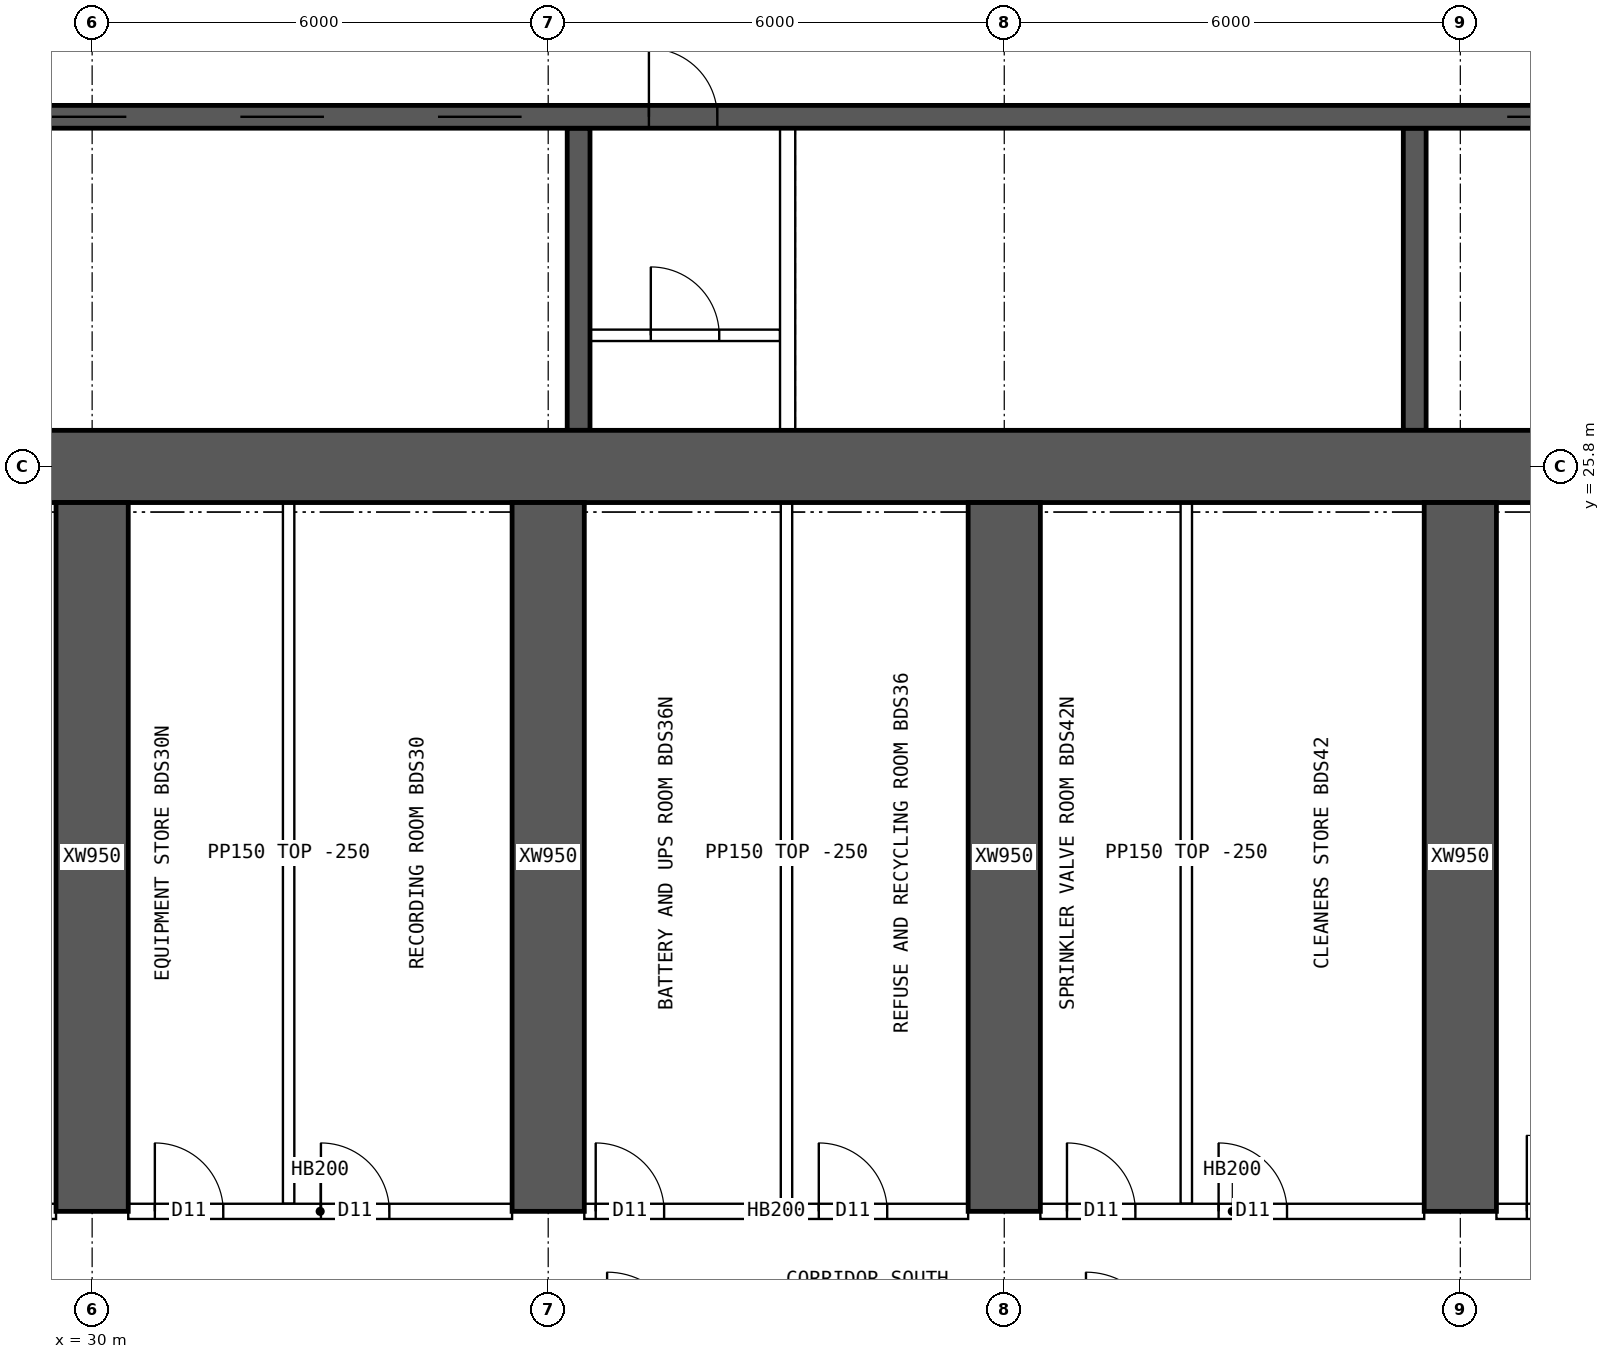
"""IFC4 building model, lengths in metres.
Left out: names, types, materials, properties, quantities, classifications, styles, units other than length and angle.
Written with IfcOpenShell. Run it as: python <this file> out.ifc"""

import sys

from ifc_helpers import new_model, si_unit, direction, frame, frame_2d, origin, place, context, subcontext, project, spatial, rectangle, extrude, element, fill, save


model = new_model("IFC4")
c1 = context("Model", 3, precision=1e-05, world=origin(), true_north=direction((0.0, 1.0)))
c2 = subcontext(c1, "Body", "Model", "MODEL_VIEW")
j1 = project(units=[si_unit("LENGTHUNIT", "METRE"), si_unit("PLANEANGLEUNIT", "RADIAN")], contexts=[c1])
p1 = place(None, origin())
s1 = spatial("IfcSite", under=j1, at=p1, CompositionType="ELEMENT")
p2 = place(p1, origin())
s2 = spatial("IfcBuilding", under=s1, at=p2, CompositionType="ELEMENT")
p3 = place(p2, frame((0.0, 0.0, 84.4)))
s3 = spatial("IfcBuildingStorey", under=s2, at=p3, CompositionType="ELEMENT", Elevation=84.4)
p4 = place(p3, frame((18.0, 25.8, 0.0), z_axis=(0.0, 0.0, 1.0), x_axis=(1.0, 0.0, 0.0)))
e1 = element("IfcWall", 1, at=p4, inside=s3, PredefinedType="SHEAR", context=c2, shape_type="SweptSolid", body=[
    extrude(rectangle(XDim=48.0, YDim=0.95, at=frame_2d((24.0, 0.0))), origin(), (0.0, 0.0, 1.0), 3.75),
])
p5 = place(p3, frame((18.475, 30.4, 0.0), z_axis=(0.0, 0.0, 1.0), x_axis=(1.0, 0.0, 0.0)))
e2 = element("IfcWall", 2, at=p5, inside=s3, PredefinedType="SHEAR", context=c2, shape_type="SweptSolid", body=[
    extrude(rectangle(XDim=47.05, YDim=0.3, at=frame_2d((23.525, 0.0))), origin(), (0.0, 0.0, 1.0), 3.75),
])
p6 = place(p5, frame((0.4, 0.0, 0.0)))
e3 = element("IfcOpeningElement", 3, at=p6, cuts=e2, PredefinedType="OPENING", context=c2, shape_type="SweptSolid", body=[
    extrude(rectangle(XDim=1.0, YDim=2.1, at=frame_2d((0.5, 1.05))), frame((0.0, 0.16, 0.0), z_axis=(0.0, -1.0, 0.0), x_axis=(1.0, 0.0, 0.0)), (0.0, 0.0, 1.0), 0.32),
])
p7 = place(p5, frame((45.65, 0.0, 0.0)))
e4 = element("IfcOpeningElement", 4, at=p7, cuts=e2, PredefinedType="OPENING", context=c2, shape_type="SweptSolid", body=[
    extrude(rectangle(XDim=1.0, YDim=2.1, at=frame_2d((0.5, 1.05))), frame((0.0, 0.16, 0.0), z_axis=(0.0, -1.0, 0.0), x_axis=(1.0, 0.0, 0.0)), (0.0, 0.0, 1.0), 0.32),
])
p8 = place(p5, frame((8.275, 0.0, 0.0)))
e5 = element("IfcOpeningElement", 5, at=p8, cuts=e2, PredefinedType="OPENING", context=c2, shape_type="SweptSolid", body=[
    extrude(rectangle(XDim=1.1, YDim=2.1, at=frame_2d((0.55, 1.05))), frame((0.0, 0.16, 0.0), z_axis=(0.0, -1.0, 0.0), x_axis=(1.0, 0.0, 0.0)), (0.0, 0.0, 1.0), 0.32),
])
p9 = place(p5, frame((10.875, 0.0, 0.0)))
e6 = element("IfcOpeningElement", 6, at=p9, cuts=e2, PredefinedType="OPENING", context=c2, shape_type="SweptSolid", body=[
    extrude(rectangle(XDim=1.1, YDim=2.1, at=frame_2d((0.55, 1.05))), frame((0.0, 0.16, 0.0), z_axis=(0.0, -1.0, 0.0), x_axis=(1.0, 0.0, 0.0)), (0.0, 0.0, 1.0), 0.32),
])
p10 = place(p5, frame((13.475, 0.0, 0.0)))
e7 = element("IfcOpeningElement", 7, at=p10, cuts=e2, PredefinedType="OPENING", context=c2, shape_type="SweptSolid", body=[
    extrude(rectangle(XDim=1.1, YDim=2.1, at=frame_2d((0.55, 1.05))), frame((0.0, 0.16, 0.0), z_axis=(0.0, -1.0, 0.0), x_axis=(1.0, 0.0, 0.0)), (0.0, 0.0, 1.0), 0.32),
])
p11 = place(p5, frame((16.075, 0.0, 0.0)))
e8 = element("IfcOpeningElement", 8, at=p11, cuts=e2, PredefinedType="OPENING", context=c2, shape_type="SweptSolid", body=[
    extrude(rectangle(XDim=1.1, YDim=2.1, at=frame_2d((0.55, 1.05))), frame((0.0, 0.16, 0.0), z_axis=(0.0, -1.0, 0.0), x_axis=(1.0, 0.0, 0.0)), (0.0, 0.0, 1.0), 0.32),
])
p12 = place(p5, frame((18.85, 0.0, 0.0)))
e9 = element("IfcOpeningElement", 9, at=p12, cuts=e2, PredefinedType="OPENING", context=c2, shape_type="SweptSolid", body=[
    extrude(rectangle(XDim=0.9, YDim=2.1, at=frame_2d((0.45, 1.05))), frame((0.0, 0.16, 0.0), z_axis=(0.0, -1.0, 0.0), x_axis=(1.0, 0.0, 0.0)), (0.0, 0.0, 1.0), 0.32),
])
p13 = place(p5, frame((30.142, 0.0, 0.0)))
e10 = element("IfcOpeningElement", 10, at=p13, cuts=e2, PredefinedType="OPENING", context=c2, shape_type="SweptSolid", body=[
    extrude(rectangle(XDim=1.1, YDim=2.1, at=frame_2d((0.55, 1.05))), frame((0.0, 0.16, 0.0), z_axis=(0.0, -1.0, 0.0), x_axis=(1.0, 0.0, 0.0)), (0.0, 0.0, 1.0), 0.32),
])
p14 = place(p5, frame((33.675, 0.0, 0.0)))
e11 = element("IfcOpeningElement", 11, at=p14, cuts=e2, PredefinedType="OPENING", context=c2, shape_type="SweptSolid", body=[
    extrude(rectangle(XDim=1.1, YDim=2.1, at=frame_2d((0.55, 1.05))), frame((0.0, 0.16, 0.0), z_axis=(0.0, -1.0, 0.0), x_axis=(1.0, 0.0, 0.0)), (0.0, 0.0, 1.0), 0.32),
])
p15 = place(p5, frame((37.208, 0.0, 0.0)))
e12 = element("IfcOpeningElement", 12, at=p15, cuts=e2, PredefinedType="OPENING", context=c2, shape_type="SweptSolid", body=[
    extrude(rectangle(XDim=1.1, YDim=2.1, at=frame_2d((0.55, 1.05))), frame((0.0, 0.16, 0.0), z_axis=(0.0, -1.0, 0.0), x_axis=(1.0, 0.0, 0.0)), (0.0, 0.0, 1.0), 0.32),
])
for number, where, z_axis, x_axis in (
    (13, (36.4, 26.275, 0.0), (0.0, 0.0, 1.0), (0.0, 1.0, 0.0)),
    (14, (47.4, 26.275, 0.0), (0.0, 0.0, 1.0), (0.0, 1.0, 0.0)),
):
    element("IfcWall", number, at=place(p3, frame(where, z_axis=z_axis, x_axis=x_axis)), inside=s3, PredefinedType="SHEAR", context=c2, shape_type="SweptSolid", body=[
        extrude(rectangle(XDim=3.975, YDim=0.3, at=frame_2d((1.988, 0.0))), origin(), (0.0, 0.0, 1.0), 3.75),
    ])
for number, where, z_axis, x_axis in (
    (15, (30.0, 16.0, 0.0), (0.0, 0.0, 1.0), (0.0, 1.0, 0.0)),
    (16, (36.0, 16.0, 0.0), (0.0, 0.0, 1.0), (0.0, 1.0, 0.0)),
    (17, (42.0, 16.0, 0.0), (0.0, 0.0, 1.0), (0.0, 1.0, 0.0)),
    (18, (48.0, 16.0, 0.0), (0.0, 0.0, 1.0), (0.0, 1.0, 0.0)),
):
    element("IfcWall", number, at=place(p3, frame(where, z_axis=z_axis, x_axis=x_axis)), inside=s3, PredefinedType="SHEAR", context=c2, shape_type="SweptSolid", body=[
        extrude(rectangle(XDim=9.325, YDim=0.95, at=frame_2d((4.663, 0.0))), origin(), (0.0, 0.0, 1.0), 3.75),
    ])
p16 = place(p3, frame((36.55, 27.525, 0.0), z_axis=(0.0, 0.0, 1.0), x_axis=(1.0, 0.0, 0.0)))
e19 = element("IfcWall", 19, at=p16, inside=s3, PredefinedType="SOLIDWALL", context=c2, shape_type="SweptSolid", body=[
    extrude(rectangle(XDim=2.5, YDim=0.15, at=frame_2d((1.25, 0.0))), origin(), (0.0, 0.0, 1.0), 3.5),
])
p17 = place(p16, frame((0.8, 0.0, 0.0)))
e20 = element("IfcOpeningElement", 20, at=p17, cuts=e19, PredefinedType="OPENING", context=c2, shape_type="SweptSolid", body=[
    extrude(rectangle(XDim=0.9, YDim=2.1, at=frame_2d((0.45, 1.05))), frame((0.0, 0.085, 0.0), z_axis=(0.0, -1.0, 0.0), x_axis=(1.0, 0.0, 0.0)), (0.0, 0.0, 1.0), 0.17),
])
p18 = place(p3, frame((39.15, 26.275, 0.0), z_axis=(0.0, 0.0, 1.0), x_axis=(0.0, 1.0, 0.0)))
e21 = element("IfcWall", 21, at=p18, inside=s3, PredefinedType="SOLIDWALL", context=c2, shape_type="SweptSolid", body=[
    extrude(rectangle(XDim=3.975, YDim=0.2, at=frame_2d((1.988, 0.0))), origin(), (0.0, 0.0, 1.0), 3.5),
])
p19 = place(p3, frame((24.475, 16.0, 0.0), z_axis=(0.0, 0.0, 1.0), x_axis=(1.0, 0.0, 0.0)))
e22 = element("IfcWall", 22, at=p19, inside=s3, PredefinedType="SOLIDWALL", context=c2, shape_type="SweptSolid", body=[
    extrude(rectangle(XDim=5.05, YDim=0.2, at=frame_2d((2.525, 0.0))), origin(), (0.0, 0.0, 1.0), 3.5),
])
p20 = place(p19, frame((0.15, 0.0, 0.0)))
e23 = element("IfcOpeningElement", 23, at=p20, cuts=e22, PredefinedType="OPENING", context=c2, shape_type="SweptSolid", body=[
    extrude(rectangle(XDim=0.9, YDim=2.1, at=frame_2d((0.45, 1.05))), frame((0.0, 0.11, 0.0), z_axis=(0.0, -1.0, 0.0), x_axis=(1.0, 0.0, 0.0)), (0.0, 0.0, 1.0), 0.22),
])
p21 = place(p19, frame((2.305, 0.0, 0.0)))
e24 = element("IfcOpeningElement", 24, at=p21, cuts=e22, PredefinedType="OPENING", context=c2, shape_type="SweptSolid", body=[
    extrude(rectangle(XDim=0.9, YDim=2.1, at=frame_2d((0.45, 1.05))), frame((0.0, 0.11, 0.0), z_axis=(0.0, -1.0, 0.0), x_axis=(1.0, 0.0, 0.0)), (0.0, 0.0, 1.0), 0.22),
])
p22 = place(p3, frame((30.475, 16.0, 0.0), z_axis=(0.0, 0.0, 1.0), x_axis=(1.0, 0.0, 0.0)))
e25 = element("IfcWall", 25, at=p22, inside=s3, PredefinedType="SOLIDWALL", context=c2, shape_type="SweptSolid", body=[
    extrude(rectangle(XDim=5.05, YDim=0.2, at=frame_2d((2.525, 0.0))), origin(), (0.0, 0.0, 1.0), 3.5),
])
p23 = place(p22, frame((0.35, 0.0, 0.0)))
e26 = element("IfcOpeningElement", 26, at=p23, cuts=e25, PredefinedType="OPENING", context=c2, shape_type="SweptSolid", body=[
    extrude(rectangle(XDim=0.9, YDim=2.1, at=frame_2d((0.45, 1.05))), frame((0.0, 0.11, 0.0), z_axis=(0.0, -1.0, 0.0), x_axis=(1.0, 0.0, 0.0)), (0.0, 0.0, 1.0), 0.22),
])
p24 = place(p22, frame((2.535, 0.0, 0.0)))
e27 = element("IfcOpeningElement", 27, at=p24, cuts=e25, PredefinedType="OPENING", context=c2, shape_type="SweptSolid", body=[
    extrude(rectangle(XDim=0.9, YDim=2.1, at=frame_2d((0.45, 1.05))), frame((0.0, 0.11, 0.0), z_axis=(0.0, -1.0, 0.0), x_axis=(1.0, 0.0, 0.0)), (0.0, 0.0, 1.0), 0.22),
])
p25 = place(p3, frame((36.475, 16.0, 0.0), z_axis=(0.0, 0.0, 1.0), x_axis=(1.0, 0.0, 0.0)))
e28 = element("IfcWall", 28, at=p25, inside=s3, PredefinedType="SOLIDWALL", context=c2, shape_type="SweptSolid", body=[
    extrude(rectangle(XDim=5.05, YDim=0.2, at=frame_2d((2.525, 0.0))), origin(), (0.0, 0.0, 1.0), 3.5),
])
p26 = place(p25, frame((0.15, 0.0, 0.0)))
e29 = element("IfcOpeningElement", 29, at=p26, cuts=e28, PredefinedType="OPENING", context=c2, shape_type="SweptSolid", body=[
    extrude(rectangle(XDim=0.9, YDim=2.1, at=frame_2d((0.45, 1.05))), frame((0.0, 0.11, 0.0), z_axis=(0.0, -1.0, 0.0), x_axis=(1.0, 0.0, 0.0)), (0.0, 0.0, 1.0), 0.22),
])
p27 = place(p25, frame((3.085, 0.0, 0.0)))
e30 = element("IfcOpeningElement", 30, at=p27, cuts=e28, PredefinedType="OPENING", context=c2, shape_type="SweptSolid", body=[
    extrude(rectangle(XDim=0.9, YDim=2.1, at=frame_2d((0.45, 1.05))), frame((0.0, 0.11, 0.0), z_axis=(0.0, -1.0, 0.0), x_axis=(1.0, 0.0, 0.0)), (0.0, 0.0, 1.0), 0.22),
])
p28 = place(p3, frame((42.475, 16.0, 0.0), z_axis=(0.0, 0.0, 1.0), x_axis=(1.0, 0.0, 0.0)))
e31 = element("IfcWall", 31, at=p28, inside=s3, PredefinedType="SOLIDWALL", context=c2, shape_type="SweptSolid", body=[
    extrude(rectangle(XDim=5.05, YDim=0.2, at=frame_2d((2.525, 0.0))), origin(), (0.0, 0.0, 1.0), 3.5),
])
p29 = place(p28, frame((0.35, 0.0, 0.0)))
e32 = element("IfcOpeningElement", 32, at=p29, cuts=e31, PredefinedType="OPENING", context=c2, shape_type="SweptSolid", body=[
    extrude(rectangle(XDim=0.9, YDim=2.1, at=frame_2d((0.45, 1.05))), frame((0.0, 0.11, 0.0), z_axis=(0.0, -1.0, 0.0), x_axis=(1.0, 0.0, 0.0)), (0.0, 0.0, 1.0), 0.22),
])
p30 = place(p28, frame((2.345, 0.0, 0.0)))
e33 = element("IfcOpeningElement", 33, at=p30, cuts=e31, PredefinedType="OPENING", context=c2, shape_type="SweptSolid", body=[
    extrude(rectangle(XDim=0.9, YDim=2.1, at=frame_2d((0.45, 1.05))), frame((0.0, 0.11, 0.0), z_axis=(0.0, -1.0, 0.0), x_axis=(1.0, 0.0, 0.0)), (0.0, 0.0, 1.0), 0.22),
])
p31 = place(p3, frame((48.475, 16.0, 0.0), z_axis=(0.0, 0.0, 1.0), x_axis=(1.0, 0.0, 0.0)))
e34 = element("IfcWall", 34, at=p31, inside=s3, PredefinedType="SOLIDWALL", context=c2, shape_type="SweptSolid", body=[
    extrude(rectangle(XDim=5.05, YDim=0.2, at=frame_2d((2.525, 0.0))), origin(), (0.0, 0.0, 1.0), 3.5),
])
p32 = place(p31, frame((0.4, 0.0, 0.0)))
e35 = element("IfcOpeningElement", 35, at=p32, cuts=e34, PredefinedType="OPENING", context=c2, shape_type="SweptSolid", body=[
    extrude(rectangle(XDim=1.0, YDim=2.1, at=frame_2d((0.5, 1.05))), frame((0.0, 0.11, 0.0), z_axis=(0.0, -1.0, 0.0), x_axis=(1.0, 0.0, 0.0)), (0.0, 0.0, 1.0), 0.22),
])
for number, where, z_axis, x_axis in (
    (36, (32.585, 16.1, 0.0), (0.0, 0.0, 1.0), (0.0, 1.0, 0.0)),
    (37, (39.135, 16.1, 0.0), (0.0, 0.0, 1.0), (0.0, 1.0, 0.0)),
    (38, (44.395, 16.1, 0.0), (0.0, 0.0, 1.0), (0.0, 1.0, 0.0)),
):
    element("IfcWall", number, at=place(p3, frame(where, z_axis=z_axis, x_axis=x_axis)), inside=s3, PredefinedType="PARTITIONING", context=c2, shape_type="SweptSolid", body=[
        extrude(rectangle(XDim=9.225, YDim=0.15, at=frame_2d((4.612, 0.0))), origin(), (0.0, 0.0, 1.0), 3.5),
    ])
p33 = place(p9, origin())
e39 = element("IfcDoor", 39, at=p33, inside=s3, OperationType="DOUBLE_DOOR_SLIDING", PredefinedType="DOOR", context=c2, shape_type="SweptSolid", body=[
    extrude(rectangle(XDim=1.1, YDim=2.1, at=frame_2d((0.55, 1.05))), frame((0.0, 0.025, 0.0), z_axis=(0.0, -1.0, 0.0), x_axis=(1.0, 0.0, 0.0)), (0.0, 0.0, 1.0), 0.05),
])
fill(e6, e39)
p34 = place(p10, origin())
e40 = element("IfcDoor", 40, at=p34, inside=s3, OperationType="DOUBLE_DOOR_SLIDING", PredefinedType="DOOR", context=c2, shape_type="SweptSolid", body=[
    extrude(rectangle(XDim=1.1, YDim=2.1, at=frame_2d((0.55, 1.05))), frame((0.0, 0.025, 0.0), z_axis=(0.0, -1.0, 0.0), x_axis=(1.0, 0.0, 0.0)), (0.0, 0.0, 1.0), 0.05),
])
fill(e7, e40)
p35 = place(p11, origin())
e41 = element("IfcDoor", 41, at=p35, inside=s3, OperationType="DOUBLE_DOOR_SLIDING", PredefinedType="DOOR", context=c2, shape_type="SweptSolid", body=[
    extrude(rectangle(XDim=1.1, YDim=2.1, at=frame_2d((0.55, 1.05))), frame((0.0, 0.025, 0.0), z_axis=(0.0, -1.0, 0.0), x_axis=(1.0, 0.0, 0.0)), (0.0, 0.0, 1.0), 0.05),
])
fill(e8, e41)
p36 = place(p17, origin())
e42 = element("IfcDoor", 42, at=p36, inside=s3, OperationType="SINGLE_SWING_LEFT", PredefinedType="DOOR", context=c2, shape_type="SweptSolid", body=[
    extrude(rectangle(XDim=0.9, YDim=2.1, at=frame_2d((0.45, 1.05))), frame((0.0, 0.025, 0.0), z_axis=(0.0, -1.0, 0.0), x_axis=(1.0, 0.0, 0.0)), (0.0, 0.0, 1.0), 0.05),
])
fill(e20, e42)
p37 = place(p12, origin())
e43 = element("IfcDoor", 43, at=p37, inside=s3, OperationType="SINGLE_SWING_LEFT", PredefinedType="DOOR", context=c2, shape_type="SweptSolid", body=[
    extrude(rectangle(XDim=0.9, YDim=2.1, at=frame_2d((0.45, 1.05))), frame((0.0, 0.025, 0.0), z_axis=(0.0, -1.0, 0.0), x_axis=(1.0, 0.0, 0.0)), (0.0, 0.0, 1.0), 0.05),
])
fill(e9, e43)
p38 = place(p13, origin())
e44 = element("IfcDoor", 44, at=p38, inside=s3, OperationType="DOUBLE_DOOR_SLIDING", PredefinedType="DOOR", context=c2, shape_type="SweptSolid", body=[
    extrude(rectangle(XDim=1.1, YDim=2.1, at=frame_2d((0.55, 1.05))), frame((0.0, 0.025, 0.0), z_axis=(0.0, -1.0, 0.0), x_axis=(1.0, 0.0, 0.0)), (0.0, 0.0, 1.0), 0.05),
])
fill(e10, e44)
p39 = place(p23, origin())
e45 = element("IfcDoor", 45, at=p39, inside=s3, OperationType="SINGLE_SWING_LEFT", PredefinedType="DOOR", context=c2, shape_type="SweptSolid", body=[
    extrude(rectangle(XDim=0.9, YDim=2.1, at=frame_2d((0.45, 1.05))), frame((0.0, 0.025, 0.0), z_axis=(0.0, -1.0, 0.0), x_axis=(1.0, 0.0, 0.0)), (0.0, 0.0, 1.0), 0.05),
])
fill(e26, e45)
p40 = place(p24, origin())
e46 = element("IfcDoor", 46, at=p40, inside=s3, OperationType="SINGLE_SWING_LEFT", PredefinedType="DOOR", context=c2, shape_type="SweptSolid", body=[
    extrude(rectangle(XDim=0.9, YDim=2.1, at=frame_2d((0.45, 1.05))), frame((0.0, 0.025, 0.0), z_axis=(0.0, -1.0, 0.0), x_axis=(1.0, 0.0, 0.0)), (0.0, 0.0, 1.0), 0.05),
])
fill(e27, e46)
p41 = place(p26, origin())
e47 = element("IfcDoor", 47, at=p41, inside=s3, OperationType="SINGLE_SWING_LEFT", PredefinedType="DOOR", context=c2, shape_type="SweptSolid", body=[
    extrude(rectangle(XDim=0.9, YDim=2.1, at=frame_2d((0.45, 1.05))), frame((0.0, 0.025, 0.0), z_axis=(0.0, -1.0, 0.0), x_axis=(1.0, 0.0, 0.0)), (0.0, 0.0, 1.0), 0.05),
])
fill(e29, e47)
p42 = place(p27, origin())
e48 = element("IfcDoor", 48, at=p42, inside=s3, OperationType="SINGLE_SWING_LEFT", PredefinedType="DOOR", context=c2, shape_type="SweptSolid", body=[
    extrude(rectangle(XDim=0.9, YDim=2.1, at=frame_2d((0.45, 1.05))), frame((0.0, 0.025, 0.0), z_axis=(0.0, -1.0, 0.0), x_axis=(1.0, 0.0, 0.0)), (0.0, 0.0, 1.0), 0.05),
])
fill(e30, e48)
p43 = place(p29, origin())
e49 = element("IfcDoor", 49, at=p43, inside=s3, OperationType="SINGLE_SWING_LEFT", PredefinedType="DOOR", context=c2, shape_type="SweptSolid", body=[
    extrude(rectangle(XDim=0.9, YDim=2.1, at=frame_2d((0.45, 1.05))), frame((0.0, 0.025, 0.0), z_axis=(0.0, -1.0, 0.0), x_axis=(1.0, 0.0, 0.0)), (0.0, 0.0, 1.0), 0.05),
])
fill(e32, e49)
p44 = place(p30, origin())
e50 = element("IfcDoor", 50, at=p44, inside=s3, OperationType="SINGLE_SWING_LEFT", PredefinedType="DOOR", context=c2, shape_type="SweptSolid", body=[
    extrude(rectangle(XDim=0.9, YDim=2.1, at=frame_2d((0.45, 1.05))), frame((0.0, 0.025, 0.0), z_axis=(0.0, -1.0, 0.0), x_axis=(1.0, 0.0, 0.0)), (0.0, 0.0, 1.0), 0.05),
])
fill(e33, e50)
p45 = place(p32, origin())
e51 = element("IfcDoor", 51, at=p45, inside=s3, OperationType="SINGLE_SWING_LEFT", PredefinedType="DOOR", context=c2, shape_type="SweptSolid", body=[
    extrude(rectangle(XDim=1.0, YDim=2.1, at=frame_2d((0.5, 1.05))), frame((0.0, 0.025, 0.0), z_axis=(0.0, -1.0, 0.0), x_axis=(1.0, 0.0, 0.0)), (0.0, 0.0, 1.0), 0.05),
])
fill(e35, e51)
save(model, sys.argv[1])
